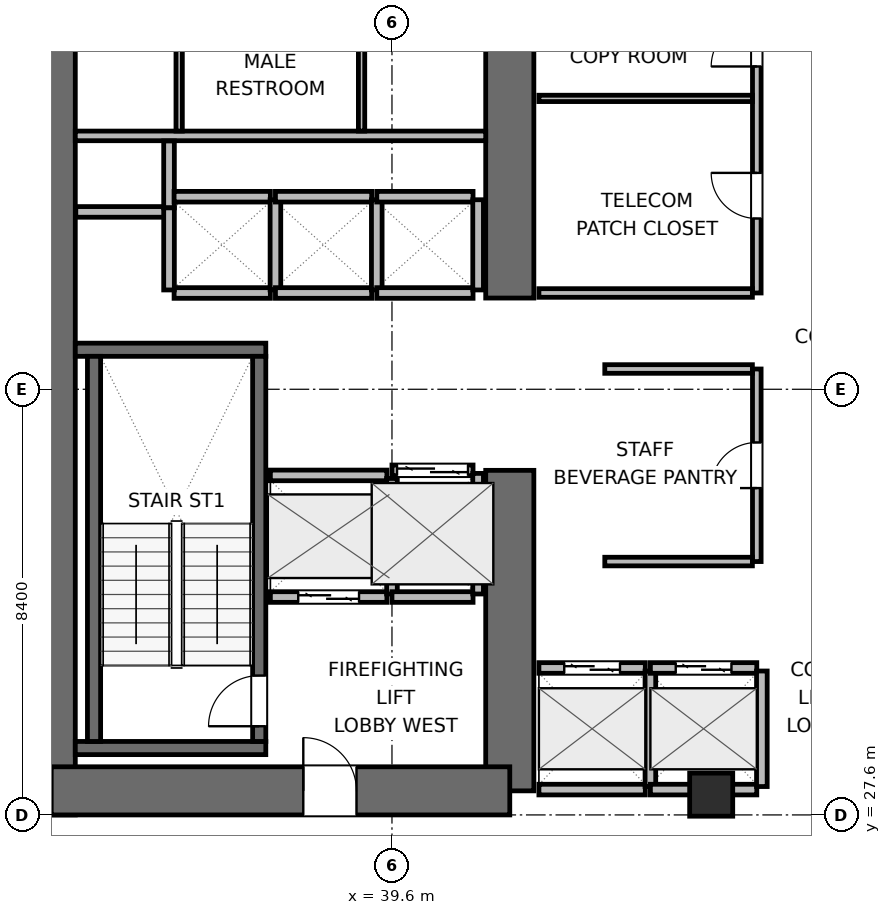
"""IFC4 building model, lengths in metres.
Left out: names, types, materials, properties, quantities, classifications, styles, units other than length and angle.
Written with IfcOpenShell. Run it as: python <this file> out.ifc"""

import sys

from ifc_helpers import new_model, si_unit, direction, frame, frame_2d, origin, origin_2d, place, context, subcontext, project, spatial, rectangle, extrude, element, fill, save


model = new_model("IFC4")
c1 = context("Model", 3, precision=1e-05, world=origin(), true_north=direction((0.0, 1.0)))
c2 = subcontext(c1, "Body", "Model", "MODEL_VIEW")
j1 = project(units=[si_unit("LENGTHUNIT", "METRE"), si_unit("PLANEANGLEUNIT", "RADIAN")], contexts=[c1])
p1 = place(None, origin())
s1 = spatial("IfcSite", under=j1, at=p1, CompositionType="ELEMENT")
p2 = place(p1, origin())
s2 = spatial("IfcBuilding", under=s1, at=p2, CompositionType="ELEMENT")
p3 = place(p2, frame((0.0, 0.0, 25.5)))
s3 = spatial("IfcBuildingStorey", under=s2, at=p3, CompositionType="ELEMENT", Elevation=25.5)
p4 = place(p3, frame((32.875, 27.6, 0.0), z_axis=(0.0, 0.0, 1.0), x_axis=(0.0, 1.0, 0.0)))
e1 = element("IfcWall", 1, at=p4, inside=s3, PredefinedType="SHEAR", context=c2, shape_type="SweptSolid", body=[
    extrude(rectangle(XDim=16.8, YDim=0.95, at=frame_2d((8.4, 0.0))), origin(), (0.0, 0.0, 1.0), 3.9),
])
p5 = place(p3, frame((41.925, 28.075, 0.0), z_axis=(0.0, 0.0, 1.0), x_axis=(0.0, 1.0, 0.0)))
e2 = element("IfcWall", 2, at=p5, inside=s3, PredefinedType="SHEAR", context=c2, shape_type="SweptSolid", body=[
    extrude(rectangle(XDim=6.325, YDim=0.95, at=frame_2d((3.163, 0.0))), origin(), (0.0, 0.0, 1.0), 3.9),
])
p6 = place(p3, frame((41.925, 37.8, 0.0), z_axis=(0.0, 0.0, 1.0), x_axis=(0.0, 1.0, 0.0)))
e3 = element("IfcWall", 3, at=p6, inside=s3, PredefinedType="SHEAR", context=c2, shape_type="SweptSolid", body=[
    extrude(rectangle(XDim=6.125, YDim=0.95, at=frame_2d((3.062, 0.0))), origin(), (0.0, 0.0, 1.0), 3.9),
])
p7 = place(p3, frame((32.875, 28.075, 0.0), z_axis=(0.0, 0.0, 1.0), x_axis=(1.0, 0.0, 0.0)))
e4 = element("IfcWall", 4, at=p7, inside=s3, PredefinedType="SHEAR", context=c2, shape_type="SweptSolid", body=[
    extrude(rectangle(XDim=9.05, YDim=0.95, at=frame_2d((4.525, 0.0))), origin(), (0.0, 0.0, 1.0), 3.9),
])
p8 = place(p7, frame((4.975, 0.0, 0.0)))
e5 = element("IfcOpeningElement", 5, at=p8, cuts=e4, PredefinedType="OPENING", context=c2, shape_type="SweptSolid", body=[
    extrude(rectangle(XDim=1.05, YDim=2.04, at=frame_2d((0.525, 1.02))), frame((0.0, 0.485, 0.0), z_axis=(0.0, -1.0, 0.0), x_axis=(1.0, 0.0, 0.0)), (0.0, 0.0, 1.0), 0.97),
])
for number, where, z_axis, x_axis in (
    (6, (33.35, 28.92, 0.0), (0.0, 0.0, 1.0), (1.0, 0.0, 0.0)),
    (7, (33.35, 36.78, 0.0), (0.0, 0.0, 1.0), (1.0, 0.0, 0.0)),
):
    element("IfcWall", number, at=place(p3, frame(where, z_axis=z_axis, x_axis=x_axis)), inside=s3, PredefinedType="SHEAR", context=c2, shape_type="SweptSolid", body=[
        extrude(rectangle(XDim=3.76, YDim=0.26, at=frame_2d((1.88, 0.0))), origin(), (0.0, 0.0, 1.0), 3.9),
    ])
p9 = place(p3, frame((33.72, 29.05, 0.0), z_axis=(0.0, 0.0, 1.0), x_axis=(0.0, 1.0, 0.0)))
e8 = element("IfcWall", 8, at=p9, inside=s3, PredefinedType="SHEAR", context=c2, shape_type="SweptSolid", body=[
    extrude(rectangle(XDim=7.6, YDim=0.26, at=frame_2d((3.8, 0.0))), origin(), (0.0, 0.0, 1.0), 3.9),
])
p10 = place(p3, frame((36.98, 29.05, 0.0), z_axis=(0.0, 0.0, 1.0), x_axis=(0.0, 1.0, 0.0)))
e9 = element("IfcWall", 9, at=p10, inside=s3, PredefinedType="SHEAR", context=c2, shape_type="SweptSolid", body=[
    extrude(rectangle(XDim=7.6, YDim=0.26, at=frame_2d((3.8, 0.0))), origin(), (0.0, 0.0, 1.0), 3.9),
])
p11 = place(p10, frame((0.3, 0.0, 0.0)))
e10 = element("IfcOpeningElement", 10, at=p11, cuts=e9, PredefinedType="OPENING", context=c2, shape_type="SweptSolid", body=[
    extrude(rectangle(XDim=1.0, YDim=2.04, at=frame_2d((0.5, 1.02))), frame((0.0, 0.14, 0.0), z_axis=(0.0, -1.0, 0.0), x_axis=(1.0, 0.0, 0.0)), (0.0, 0.0, 1.0), 0.28),
])
p12 = place(p3, frame((45.9, 28.0, 0.0), z_axis=(0.0, 0.0, 1.0), x_axis=(1.0, 0.0, 0.0)))
e11 = element("IfcColumn", 11, at=p12, inside=s3, PredefinedType="COLUMN", context=c2, shape_type="SweptSolid", body=[
    extrude(rectangle(XDim=0.85, YDim=0.85, at=origin_2d()), origin(), (0.0, 0.0, 1.0), 3.9),
])
p13 = place(p3, frame((33.35, 41.0, 0.0), z_axis=(0.0, 0.0, 1.0), x_axis=(1.0, 0.0, 0.0)))
e12 = element("IfcWall", 12, at=p13, inside=s3, PredefinedType="PLUMBINGWALL", context=c2, shape_type="SweptSolid", body=[
    extrude(rectangle(XDim=8.1, YDim=0.19, at=frame_2d((4.05, 0.0))), origin(), (0.0, 0.0, 1.0), 3.64),
])
for number, where, z_axis, x_axis in (
    (13, (35.4, 41.095, 0.0), (0.0, 0.0, 1.0), (0.0, 1.0, 0.0)),
    (14, (39.0, 41.095, 0.0), (0.0, 0.0, 1.0), (0.0, 1.0, 0.0)),
):
    element("IfcWall", number, at=place(p3, frame(where, z_axis=z_axis, x_axis=x_axis)), inside=s3, PredefinedType="PARTITIONING", context=c2, shape_type="SweptSolid", body=[
        extrude(rectangle(XDim=2.355, YDim=0.125, at=frame_2d((1.177, 0.0))), origin(), (0.0, 0.0, 1.0), 3.64),
    ])
p14 = place(p3, frame((33.36, 39.5, 0.0), z_axis=(0.0, 0.0, 1.0), x_axis=(1.0, 0.0, 0.0)))
e15 = element("IfcWall", 15, at=p14, inside=s3, PredefinedType="PARTITIONING", context=c2, shape_type="SweptSolid", body=[
    extrude(rectangle(XDim=1.86, YDim=0.21, at=frame_2d((0.93, 0.0))), origin(), (0.0, 0.0, 1.0), 3.64),
])
p15 = place(p3, frame((35.2, 39.58, 0.0), z_axis=(0.0, 0.0, 1.0), x_axis=(0.0, 1.0, 0.0)))
e16 = element("IfcWall", 16, at=p15, inside=s3, PredefinedType="PARTITIONING", context=c2, shape_type="SweptSolid", body=[
    extrude(rectangle(XDim=1.32, YDim=0.21, at=frame_2d((0.66, 0.0))), origin(), (0.0, 0.0, 1.0), 3.64),
])
p16 = place(p3, frame((37.2, 31.9, 0.0), z_axis=(0.0, 0.0, 1.0), x_axis=(1.0, 0.0, 0.0)))
e17 = element("IfcWall", 17, at=p16, inside=s3, PredefinedType="PARTITIONING", context=c2, shape_type="SweptSolid", body=[
    extrude(rectangle(XDim=2.3, YDim=0.21, at=frame_2d((1.15, 0.0))), origin(), (0.0, 0.0, 1.0), 3.64),
])
p17 = place(p16, frame((0.55, 0.0, 0.0)))
e18 = element("IfcOpeningElement", 18, at=p17, cuts=e17, PredefinedType="OPENING", context=c2, shape_type="SweptSolid", body=[
    extrude(rectangle(XDim=1.2, YDim=2.04, at=frame_2d((0.6, 1.02))), frame((0.0, 0.115, 0.0), z_axis=(0.0, -1.0, 0.0), x_axis=(1.0, 0.0, 0.0)), (0.0, 0.0, 1.0), 0.23),
])
p18 = place(p3, frame((37.2, 34.3, 0.0), z_axis=(0.0, 0.0, 1.0), x_axis=(1.0, 0.0, 0.0)))
e19 = element("IfcWall", 19, at=p18, inside=s3, PredefinedType="PARTITIONING", context=c2, shape_type="SweptSolid", body=[
    extrude(rectangle(XDim=2.3, YDim=0.21, at=frame_2d((1.15, 0.0))), origin(), (0.0, 0.0, 1.0), 3.64),
])
p19 = place(p3, frame((39.6, 31.96, 0.0), z_axis=(0.0, 0.0, 1.0), x_axis=(0.0, 1.0, 0.0)))
e20 = element("IfcWall", 20, at=p19, inside=s3, PredefinedType="PARTITIONING", context=c2, shape_type="SweptSolid", body=[
    extrude(rectangle(XDim=2.28, YDim=0.21, at=frame_2d((1.14, 0.0))), origin(), (0.0, 0.0, 1.0), 3.64),
])
p20 = place(p3, frame((39.6, 34.4, 0.0), z_axis=(0.0, 0.0, 1.0), x_axis=(1.0, 0.0, 0.0)))
e21 = element("IfcWall", 21, at=p20, inside=s3, PredefinedType="PARTITIONING", context=c2, shape_type="SweptSolid", body=[
    extrude(rectangle(XDim=1.6, YDim=0.21, at=frame_2d((0.8, 0.0))), origin(), (0.0, 0.0, 1.0), 3.64),
])
p21 = place(p20, frame((0.1, 0.0, 0.0)))
e22 = element("IfcOpeningElement", 22, at=p21, cuts=e21, PredefinedType="OPENING", context=c2, shape_type="SweptSolid", body=[
    extrude(rectangle(XDim=1.4, YDim=2.06, at=frame_2d((0.7, 1.03))), frame((0.0, 0.115, 0.0), z_axis=(0.0, -1.0, 0.0), x_axis=(1.0, 0.0, 0.0)), (0.0, 0.0, 1.0), 0.23),
])
p22 = place(p3, frame((39.6, 31.9, 0.0), z_axis=(0.0, 0.0, 1.0), x_axis=(1.0, 0.0, 0.0)))
e23 = element("IfcWall", 23, at=p22, inside=s3, PredefinedType="PARTITIONING", context=c2, shape_type="SweptSolid", body=[
    extrude(rectangle(XDim=1.6, YDim=0.21, at=frame_2d((0.8, 0.0))), origin(), (0.0, 0.0, 1.0), 3.64),
])
p23 = place(p3, frame((41.3, 31.96, 0.0), z_axis=(0.0, 0.0, 1.0), x_axis=(0.0, 1.0, 0.0)))
e24 = element("IfcWall", 24, at=p23, inside=s3, PredefinedType="PARTITIONING", context=c2, shape_type="SweptSolid", body=[
    extrude(rectangle(XDim=2.38, YDim=0.21, at=frame_2d((1.19, 0.0))), origin(), (0.0, 0.0, 1.0), 3.64),
])
p24 = place(p3, frame((42.5, 30.5, 0.0), z_axis=(0.0, 0.0, 1.0), x_axis=(1.0, 0.0, 0.0)))
e25 = element("IfcWall", 25, at=p24, inside=s3, PredefinedType="PARTITIONING", context=c2, shape_type="SweptSolid", body=[
    extrude(rectangle(XDim=2.1, YDim=0.21, at=frame_2d((1.05, 0.0))), origin(), (0.0, 0.0, 1.0), 3.64),
])
p25 = place(p24, frame((0.5, 0.0, 0.0)))
e26 = element("IfcOpeningElement", 26, at=p25, cuts=e25, PredefinedType="OPENING", context=c2, shape_type="SweptSolid", body=[
    extrude(rectangle(XDim=1.1, YDim=2.04, at=frame_2d((0.55, 1.02))), frame((0.0, 0.115, 0.0), z_axis=(0.0, -1.0, 0.0), x_axis=(1.0, 0.0, 0.0)), (0.0, 0.0, 1.0), 0.23),
])
p26 = place(p3, frame((42.5, 28.1, 0.0), z_axis=(0.0, 0.0, 1.0), x_axis=(1.0, 0.0, 0.0)))
e27 = element("IfcWall", 27, at=p26, inside=s3, PredefinedType="PARTITIONING", context=c2, shape_type="SweptSolid", body=[
    extrude(rectangle(XDim=2.1, YDim=0.21, at=frame_2d((1.05, 0.0))), origin(), (0.0, 0.0, 1.0), 2.525),
])
p27 = place(p3, frame((44.7, 28.16, 0.0), z_axis=(0.0, 0.0, 1.0), x_axis=(0.0, 1.0, 0.0)))
e28 = element("IfcWall", 28, at=p27, inside=s3, PredefinedType="PARTITIONING", context=c2, shape_type="SweptSolid", body=[
    extrude(rectangle(XDim=2.28, YDim=0.21, at=frame_2d((1.14, 0.0))), origin(), (0.0, 0.0, 1.0), 3.64),
])
p28 = place(p3, frame((44.7, 30.5, 0.0), z_axis=(0.0, 0.0, 1.0), x_axis=(1.0, 0.0, 0.0)))
e29 = element("IfcWall", 29, at=p28, inside=s3, PredefinedType="PARTITIONING", context=c2, shape_type="SweptSolid", body=[
    extrude(rectangle(XDim=2.1, YDim=0.21, at=frame_2d((1.05, 0.0))), origin(), (0.0, 0.0, 1.0), 3.64),
])
p29 = place(p28, frame((0.5, 0.0, 0.0)))
e30 = element("IfcOpeningElement", 30, at=p29, cuts=e29, PredefinedType="OPENING", context=c2, shape_type="SweptSolid", body=[
    extrude(rectangle(XDim=1.1, YDim=2.04, at=frame_2d((0.55, 1.02))), frame((0.0, 0.115, 0.0), z_axis=(0.0, -1.0, 0.0), x_axis=(1.0, 0.0, 0.0)), (0.0, 0.0, 1.0), 0.23),
])
p30 = place(p3, frame((44.7, 28.1, 0.0), z_axis=(0.0, 0.0, 1.0), x_axis=(1.0, 0.0, 0.0)))
e31 = element("IfcWall", 31, at=p30, inside=s3, PredefinedType="PARTITIONING", context=c2, shape_type="SweptSolid", body=[
    extrude(rectangle(XDim=2.1, YDim=0.21, at=frame_2d((1.05, 0.0))), origin(), (0.0, 0.0, 1.0), 2.525),
])
p31 = place(p3, frame((46.9, 28.16, 0.0), z_axis=(0.0, 0.0, 1.0), x_axis=(0.0, 1.0, 0.0)))
e32 = element("IfcWall", 32, at=p31, inside=s3, PredefinedType="PARTITIONING", context=c2, shape_type="SweptSolid", body=[
    extrude(rectangle(XDim=2.28, YDim=0.21, at=frame_2d((1.14, 0.0))), origin(), (0.0, 0.0, 1.0), 3.64),
])
for number, where, z_axis, x_axis in (
    (33, (35.3, 37.9, 0.0), (0.0, 0.0, 1.0), (1.0, 0.0, 0.0)),
    (34, (35.3, 39.8, 0.0), (0.0, 0.0, 1.0), (1.0, 0.0, 0.0)),
):
    element("IfcWall", number, at=place(p3, frame(where, z_axis=z_axis, x_axis=x_axis)), inside=s3, PredefinedType="PARTITIONING", context=c2, shape_type="SweptSolid", body=[
        extrude(rectangle(XDim=1.9, YDim=0.21, at=frame_2d((0.95, 0.0))), origin(), (0.0, 0.0, 1.0), 3.64),
    ])
p32 = place(p3, frame((35.2, 37.96, 0.0), z_axis=(0.0, 0.0, 1.0), x_axis=(0.0, 1.0, 0.0)))
e35 = element("IfcWall", 35, at=p32, inside=s3, PredefinedType="PARTITIONING", context=c2, shape_type="SweptSolid", body=[
    extrude(rectangle(XDim=1.62, YDim=0.21, at=frame_2d((0.81, 0.0))), origin(), (0.0, 0.0, 1.0), 3.64),
])
p33 = place(p3, frame((37.3, 37.96, 0.0), z_axis=(0.0, 0.0, 1.0), x_axis=(0.0, 1.0, 0.0)))
e36 = element("IfcWall", 36, at=p33, inside=s3, PredefinedType="PARTITIONING", context=c2, shape_type="SweptSolid", body=[
    extrude(rectangle(XDim=1.78, YDim=0.21, at=frame_2d((0.89, 0.0))), origin(), (0.0, 0.0, 1.0), 3.64),
])
for number, where, z_axis, x_axis in (
    (37, (37.3, 37.9, 0.0), (0.0, 0.0, 1.0), (1.0, 0.0, 0.0)),
    (38, (37.3, 39.8, 0.0), (0.0, 0.0, 1.0), (1.0, 0.0, 0.0)),
):
    element("IfcWall", number, at=place(p3, frame(where, z_axis=z_axis, x_axis=x_axis)), inside=s3, PredefinedType="PARTITIONING", context=c2, shape_type="SweptSolid", body=[
        extrude(rectangle(XDim=1.9, YDim=0.21, at=frame_2d((0.95, 0.0))), origin(), (0.0, 0.0, 1.0), 3.64),
    ])
p34 = place(p3, frame((39.3, 37.96, 0.0), z_axis=(0.0, 0.0, 1.0), x_axis=(0.0, 1.0, 0.0)))
e39 = element("IfcWall", 39, at=p34, inside=s3, PredefinedType="PARTITIONING", context=c2, shape_type="SweptSolid", body=[
    extrude(rectangle(XDim=1.78, YDim=0.21, at=frame_2d((0.89, 0.0))), origin(), (0.0, 0.0, 1.0), 3.64),
])
for number, where, z_axis, x_axis in (
    (40, (39.3, 37.9, 0.0), (0.0, 0.0, 1.0), (1.0, 0.0, 0.0)),
    (41, (39.3, 39.8, 0.0), (0.0, 0.0, 1.0), (1.0, 0.0, 0.0)),
):
    element("IfcWall", number, at=place(p3, frame(where, z_axis=z_axis, x_axis=x_axis)), inside=s3, PredefinedType="PARTITIONING", context=c2, shape_type="SweptSolid", body=[
        extrude(rectangle(XDim=1.9, YDim=0.21, at=frame_2d((0.95, 0.0))), origin(), (0.0, 0.0, 1.0), 3.64),
    ])
p35 = place(p3, frame((41.3, 37.96, 0.0), z_axis=(0.0, 0.0, 1.0), x_axis=(0.0, 1.0, 0.0)))
e42 = element("IfcWall", 42, at=p35, inside=s3, PredefinedType="PARTITIONING", context=c2, shape_type="SweptSolid", body=[
    extrude(rectangle(XDim=1.78, YDim=0.21, at=frame_2d((0.89, 0.0))), origin(), (0.0, 0.0, 1.0), 3.64),
])
p36 = place(p3, frame((46.8, 32.6, 0.0), z_axis=(0.0, 0.0, 1.0), x_axis=(0.0, 1.0, 0.0)))
e43 = element("IfcWall", 43, at=p36, inside=s3, PredefinedType="PARTITIONING", context=c2, shape_type="SweptSolid", body=[
    extrude(rectangle(XDim=3.8, YDim=0.17, at=frame_2d((1.9, 0.0))), origin(), (0.0, 0.0, 1.0), 3.64),
])
p37 = place(p36, frame((1.45, 0.0, 0.0)))
e44 = element("IfcOpeningElement", 44, at=p37, cuts=e43, PredefinedType="OPENING", context=c2, shape_type="SweptSolid", body=[
    extrude(rectangle(XDim=0.9, YDim=2.02, at=frame_2d((0.45, 1.01))), frame((0.0, 0.095, 0.0), z_axis=(0.0, -1.0, 0.0), x_axis=(1.0, 0.0, 0.0)), (0.0, 0.0, 1.0), 0.19),
])
for number, where, z_axis, x_axis in (
    (45, (43.8, 32.6, 0.0), (0.0, 0.0, 1.0), (1.0, 0.0, 0.0)),
    (46, (43.8, 36.4, 0.0), (0.0, 0.0, 1.0), (1.0, 0.0, 0.0)),
):
    element("IfcWall", number, at=place(p3, frame(where, z_axis=z_axis, x_axis=x_axis)), inside=s3, PredefinedType="PARTITIONING", context=c2, shape_type="SweptSolid", body=[
        extrude(rectangle(XDim=2.913, YDim=0.17, at=frame_2d((1.457, 0.0))), origin(), (0.0, 0.0, 1.0), 3.64),
    ])
p38 = place(p3, frame((46.8, 37.9, 0.0), z_axis=(0.0, 0.0, 1.0), x_axis=(0.0, 1.0, 0.0)))
e47 = element("IfcWall", 47, at=p38, inside=s3, PredefinedType="PARTITIONING", context=c2, shape_type="SweptSolid", body=[
    extrude(rectangle(XDim=6.0, YDim=0.17, at=frame_2d((3.0, 0.0))), origin(), (0.0, 0.0, 1.0), 3.64),
])
p39 = place(p38, frame((1.47, 0.0, 0.0)))
e48 = element("IfcOpeningElement", 48, at=p39, cuts=e47, PredefinedType="OPENING", context=c2, shape_type="SweptSolid", body=[
    extrude(rectangle(XDim=0.9, YDim=2.02, at=frame_2d((0.45, 1.01))), frame((0.0, 0.095, 0.0), z_axis=(0.0, -1.0, 0.0), x_axis=(1.0, 0.0, 0.0)), (0.0, 0.0, 1.0), 0.19),
])
p40 = place(p38, frame((4.47, 0.0, 0.0)))
e49 = element("IfcOpeningElement", 49, at=p40, cuts=e47, PredefinedType="OPENING", context=c2, shape_type="SweptSolid", body=[
    extrude(rectangle(XDim=0.9, YDim=2.02, at=frame_2d((0.45, 1.01))), frame((0.0, 0.095, 0.0), z_axis=(0.0, -1.0, 0.0), x_axis=(1.0, 0.0, 0.0)), (0.0, 0.0, 1.0), 0.19),
])
p41 = place(p3, frame((42.5, 37.9, 0.0), z_axis=(0.0, 0.0, 1.0), x_axis=(1.0, 0.0, 0.0)))
e50 = element("IfcWall", 50, at=p41, inside=s3, PredefinedType="PARTITIONING", context=c2, shape_type="SweptSolid", body=[
    extrude(rectangle(XDim=4.213, YDim=0.17, at=frame_2d((2.106, 0.0))), origin(), (0.0, 0.0, 1.0), 3.64),
])
p42 = place(p3, frame((42.5, 41.74, 0.0), z_axis=(0.0, 0.0, 1.0), x_axis=(1.0, 0.0, 0.0)))
e51 = element("IfcWall", 51, at=p42, inside=s3, PredefinedType="PARTITIONING", context=c2, shape_type="SweptSolid", body=[
    extrude(rectangle(XDim=4.213, YDim=0.125, at=frame_2d((2.106, 0.0))), origin(), (0.0, 0.0, 1.0), 3.64),
])
p43 = place(p11, origin())
e52 = element("IfcDoor", 52, at=p43, inside=s3, OperationType="SINGLE_SWING_LEFT", PredefinedType="DOOR", context=c2, shape_type="SweptSolid", body=[
    extrude(rectangle(XDim=1.0, YDim=2.04, at=frame_2d((0.5, 1.02))), frame((0.0, 0.025, 0.0), z_axis=(0.0, -1.0, 0.0), x_axis=(1.0, 0.0, 0.0)), (0.0, 0.0, 1.0), 0.05),
])
fill(e10, e52)
p44 = place(p17, origin())
e53 = element("IfcDoor", 53, at=p44, inside=s3, OperationType="DOUBLE_DOOR_SLIDING", PredefinedType="DOOR", context=c2, shape_type="SweptSolid", body=[
    extrude(rectangle(XDim=1.2, YDim=2.04, at=frame_2d((0.6, 1.02))), frame((0.0, 0.025, 0.0), z_axis=(0.0, -1.0, 0.0), x_axis=(1.0, 0.0, 0.0)), (0.0, 0.0, 1.0), 0.05),
])
fill(e18, e53)
p45 = place(p21, origin())
e54 = element("IfcDoor", 54, at=p45, inside=s3, OperationType="DOUBLE_DOOR_SLIDING", PredefinedType="DOOR", context=c2, shape_type="SweptSolid", body=[
    extrude(rectangle(XDim=1.4, YDim=2.06, at=frame_2d((0.7, 1.03))), frame((0.0, 0.025, 0.0), z_axis=(0.0, -1.0, 0.0), x_axis=(1.0, 0.0, 0.0)), (0.0, 0.0, 1.0), 0.05),
])
fill(e22, e54)
p46 = place(p25, origin())
e55 = element("IfcDoor", 55, at=p46, inside=s3, OperationType="DOUBLE_DOOR_SLIDING", PredefinedType="DOOR", context=c2, shape_type="SweptSolid", body=[
    extrude(rectangle(XDim=1.1, YDim=2.04, at=frame_2d((0.55, 1.02))), frame((0.0, 0.025, 0.0), z_axis=(0.0, -1.0, 0.0), x_axis=(1.0, 0.0, 0.0)), (0.0, 0.0, 1.0), 0.05),
])
fill(e26, e55)
p47 = place(p29, origin())
e56 = element("IfcDoor", 56, at=p47, inside=s3, OperationType="DOUBLE_DOOR_SLIDING", PredefinedType="DOOR", context=c2, shape_type="SweptSolid", body=[
    extrude(rectangle(XDim=1.1, YDim=2.04, at=frame_2d((0.55, 1.02))), frame((0.0, 0.025, 0.0), z_axis=(0.0, -1.0, 0.0), x_axis=(1.0, 0.0, 0.0)), (0.0, 0.0, 1.0), 0.05),
])
fill(e30, e56)
p48 = place(p8, origin())
e57 = element("IfcDoor", 57, at=p48, inside=s3, OperationType="SINGLE_SWING_LEFT", PredefinedType="DOOR", context=c2, shape_type="SweptSolid", body=[
    extrude(rectangle(XDim=1.05, YDim=2.04, at=frame_2d((0.525, 1.02))), frame((0.0, 0.025, 0.0), z_axis=(0.0, -1.0, 0.0), x_axis=(1.0, 0.0, 0.0)), (0.0, 0.0, 1.0), 0.05),
])
fill(e5, e57)
p49 = place(p37, origin())
e58 = element("IfcDoor", 58, at=p49, inside=s3, OperationType="SINGLE_SWING_LEFT", PredefinedType="DOOR", context=c2, shape_type="SweptSolid", body=[
    extrude(rectangle(XDim=0.9, YDim=2.02, at=frame_2d((0.45, 1.01))), frame((0.0, 0.025, 0.0), z_axis=(0.0, -1.0, 0.0), x_axis=(1.0, 0.0, 0.0)), (0.0, 0.0, 1.0), 0.05),
])
fill(e44, e58)
p50 = place(p39, origin())
e59 = element("IfcDoor", 59, at=p50, inside=s3, OperationType="SINGLE_SWING_RIGHT", PredefinedType="DOOR", context=c2, shape_type="SweptSolid", body=[
    extrude(rectangle(XDim=0.9, YDim=2.02, at=frame_2d((0.45, 1.01))), frame((0.0, 0.025, 0.0), z_axis=(0.0, -1.0, 0.0), x_axis=(1.0, 0.0, 0.0)), (0.0, 0.0, 1.0), 0.05),
])
fill(e48, e59)
p51 = place(p40, origin())
e60 = element("IfcDoor", 60, at=p51, inside=s3, OperationType="SINGLE_SWING_LEFT", PredefinedType="DOOR", context=c2, shape_type="SweptSolid", body=[
    extrude(rectangle(XDim=0.9, YDim=2.02, at=frame_2d((0.45, 1.01))), frame((0.0, 0.025, 0.0), z_axis=(0.0, -1.0, 0.0), x_axis=(1.0, 0.0, 0.0)), (0.0, 0.0, 1.0), 0.05),
])
fill(e49, e60)
save(model, sys.argv[1])
